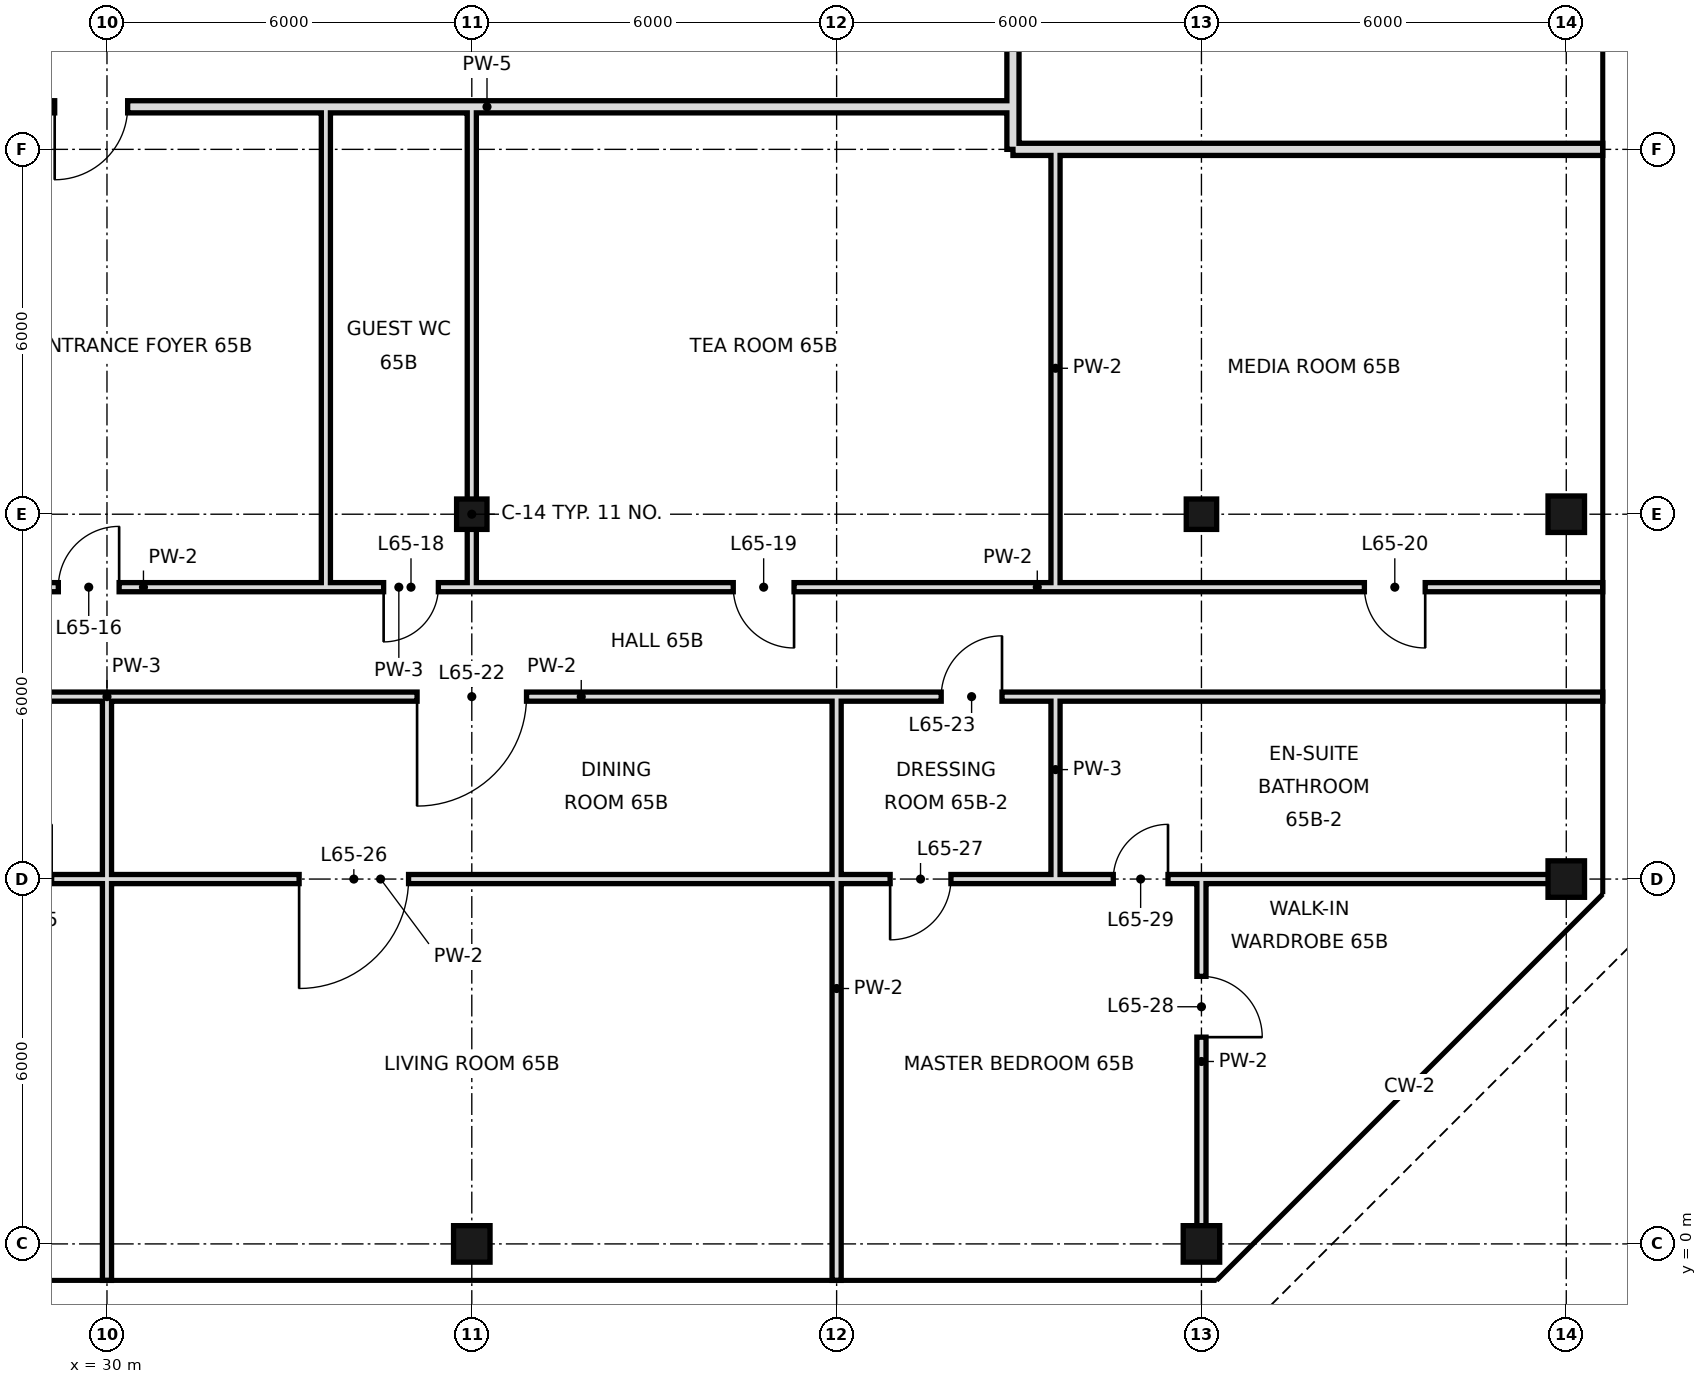
"""IFC4 building model, lengths in metres.
Left out: names, types, materials, properties, quantities, classifications, styles, units other than length and angle.
Written with IfcOpenShell. Run it as: python <this file> out.ifc"""

import sys

from ifc_helpers import new_model, si_unit, direction, frame, frame_2d, origin, origin_2d, place, context, subcontext, project, spatial, rectangle, hollow_rectangle, extrude, element, fill, save


model = new_model("IFC4")
c1 = context("Model", 3, precision=1e-05, world=origin(), true_north=direction((0.0, 1.0)))
c2 = subcontext(c1, "Body", "Model", "MODEL_VIEW")
j1 = project(units=[si_unit("LENGTHUNIT", "METRE"), si_unit("PLANEANGLEUNIT", "RADIAN")], contexts=[c1])
p1 = place(None, origin())
s1 = spatial("IfcSite", under=j1, at=p1, CompositionType="ELEMENT")
p2 = place(p1, origin())
s2 = spatial("IfcBuilding", under=s1, at=p2, CompositionType="ELEMENT")
p3 = place(p2, frame((0.0, 0.0, 273.8)))
s3 = spatial("IfcBuildingStorey", under=s2, at=p3, CompositionType="ELEMENT", Elevation=273.8)
p4 = place(p3, frame((36.0, 0.0, 0.0), z_axis=(0.0, 0.0, 1.0), x_axis=(1.0, 0.0, 0.0)))
e1 = element("IfcColumn", 1, at=p4, inside=s3, PredefinedType="COLUMN", context=c2, shape_type="SweptSolid", body=[
    extrude(hollow_rectangle(XDim=0.6, YDim=0.6, WallThickness=0.028, at=origin_2d()), origin(), (0.0, 0.0, 1.0), 3.6),
])
p5 = place(p3, frame((36.0, 12.0, 0.0), z_axis=(0.0, 0.0, 1.0), x_axis=(1.0, 0.0, 0.0)))
e2 = element("IfcColumn", 2, at=p5, inside=s3, PredefinedType="COLUMN", context=c2, shape_type="SweptSolid", body=[
    extrude(hollow_rectangle(XDim=0.5, YDim=0.5, WallThickness=0.025, at=origin_2d()), origin(), (0.0, 0.0, 1.0), 3.6),
])
p6 = place(p3, frame((48.0, 0.0, 0.0), z_axis=(0.0, 0.0, 1.0), x_axis=(1.0, 0.0, 0.0)))
e3 = element("IfcColumn", 3, at=p6, inside=s3, PredefinedType="COLUMN", context=c2, shape_type="SweptSolid", body=[
    extrude(hollow_rectangle(XDim=0.6, YDim=0.6, WallThickness=0.028, at=origin_2d()), origin(), (0.0, 0.0, 1.0), 3.6),
])
p7 = place(p3, frame((48.0, 12.0, 0.0), z_axis=(0.0, 0.0, 1.0), x_axis=(1.0, 0.0, 0.0)))
e4 = element("IfcColumn", 4, at=p7, inside=s3, PredefinedType="COLUMN", context=c2, shape_type="SweptSolid", body=[
    extrude(hollow_rectangle(XDim=0.5, YDim=0.5, WallThickness=0.025, at=origin_2d()), origin(), (0.0, 0.0, 1.0), 3.6),
])
for number, where, z_axis, x_axis in (
    (5, (54.0, 6.0, 0.0), (0.0, 0.0, 1.0), (1.0, 0.0, 0.0)),
    (6, (54.0, 12.0, 0.0), (0.0, 0.0, 1.0), (1.0, 0.0, 0.0)),
):
    element("IfcColumn", number, at=place(p3, frame(where, z_axis=z_axis, x_axis=x_axis)), inside=s3, PredefinedType="COLUMN", context=c2, shape_type="SweptSolid", body=[
        extrude(hollow_rectangle(XDim=0.6, YDim=0.6, WallThickness=0.028, at=origin_2d()), origin(), (0.0, 0.0, 1.0), 3.6),
    ])
p8 = place(p3, frame((30.0, -0.6, 0.0), z_axis=(0.0, 0.0, 1.0), x_axis=(0.0, 1.0, 0.0)))
e7 = element("IfcWall", 7, at=p8, inside=s3, PredefinedType="PARTITIONING", context=c2, shape_type="SweptSolid", body=[
    extrude(rectangle(XDim=6.6, YDim=0.15, at=frame_2d((3.3, 0.0))), origin(), (0.0, 0.0, 1.0), 2.72),
])
p9 = place(p3, frame((30.0, 6.0, 0.0), z_axis=(0.0, 0.0, 1.0), x_axis=(0.0, 1.0, 0.0)))
e8 = element("IfcWall", 8, at=p9, inside=s3, PredefinedType="PARTITIONING", context=c2, shape_type="SweptSolid", body=[
    extrude(rectangle(XDim=3.0, YDim=0.15, at=frame_2d((1.5, 0.0))), origin(), (0.0, 0.0, 1.0), 2.72),
])
p10 = place(p3, frame((33.6, 10.8, 0.0), z_axis=(0.0, 0.0, 1.0), x_axis=(0.0, 1.0, 0.0)))
e9 = element("IfcWall", 9, at=p10, inside=s3, PredefinedType="PARTITIONING", context=c2, shape_type="SweptSolid", body=[
    extrude(rectangle(XDim=7.9, YDim=0.15, at=frame_2d((3.95, 0.0))), origin(), (0.0, 0.0, 1.0), 3.42),
])
p11 = place(p3, frame((36.0, 10.8, 0.0), z_axis=(0.0, 0.0, 1.0), x_axis=(0.0, 1.0, 0.0)))
e10 = element("IfcWall", 10, at=p11, inside=s3, PredefinedType="PARTITIONING", context=c2, shape_type="SweptSolid", body=[
    extrude(rectangle(XDim=7.9, YDim=0.15, at=frame_2d((3.95, 0.0))), origin(), (0.0, 0.0, 1.0), 2.72),
])
p12 = place(p3, frame((42.0, -0.6, 0.0), z_axis=(0.0, 0.0, 1.0), x_axis=(0.0, 1.0, 0.0)))
e11 = element("IfcWall", 11, at=p12, inside=s3, PredefinedType="PARTITIONING", context=c2, shape_type="SweptSolid", body=[
    extrude(rectangle(XDim=9.6, YDim=0.15, at=frame_2d((4.8, 0.0))), origin(), (0.0, 0.0, 1.0), 2.72),
])
p13 = place(p3, frame((44.9, 18.0, 0.0), z_axis=(0.0, 0.0, 1.0), x_axis=(0.0, 1.0, 0.0)))
e12 = element("IfcWall", 12, at=p13, inside=s3, PredefinedType="SOLIDWALL", context=c2, shape_type="SweptSolid", body=[
    extrude(rectangle(XDim=30.6, YDim=0.2, at=frame_2d((15.3, 0.0))), origin(), (0.0, 0.0, 1.0), 2.72),
])
p14 = place(p13, frame((20.27, 0.0, 0.0)))
e13 = element("IfcOpeningElement", 13, at=p14, cuts=e12, PredefinedType="OPENING", context=c2, shape_type="SweptSolid", body=[
    extrude(rectangle(XDim=1.2, YDim=2.4, at=frame_2d((0.6, 1.2))), frame((0.0, 0.11, 0.0), z_axis=(0.0, -1.0, 0.0), x_axis=(1.0, 0.0, 0.0)), (0.0, 0.0, 1.0), 0.22),
])
p15 = place(p3, frame((45.6, 10.8, 0.0), z_axis=(0.0, 0.0, 1.0), x_axis=(0.0, 1.0, 0.0)))
e14 = element("IfcWall", 14, at=p15, inside=s3, PredefinedType="PARTITIONING", context=c2, shape_type="SweptSolid", body=[
    extrude(rectangle(XDim=7.2, YDim=0.15, at=frame_2d((3.6, 0.0))), origin(), (0.0, 0.0, 1.0), 3.42),
])
p16 = place(p3, frame((45.6, 6.0, 0.0), z_axis=(0.0, 0.0, 1.0), x_axis=(0.0, 1.0, 0.0)))
e15 = element("IfcWall", 15, at=p16, inside=s3, PredefinedType="PARTITIONING", context=c2, shape_type="SweptSolid", body=[
    extrude(rectangle(XDim=3.0, YDim=0.15, at=frame_2d((1.5, 0.0))), origin(), (0.0, 0.0, 1.0), 3.42),
])
p17 = place(p3, frame((48.0, 0.0, 0.0), z_axis=(0.0, 0.0, 1.0), x_axis=(0.0, 1.0, 0.0)))
e16 = element("IfcWall", 16, at=p17, inside=s3, PredefinedType="PARTITIONING", context=c2, shape_type="SweptSolid", body=[
    extrude(rectangle(XDim=6.0, YDim=0.15, at=frame_2d((3.0, 0.0))), origin(), (0.0, 0.0, 1.0), 2.72),
])
p18 = place(p17, frame((3.4, 0.0, 0.0)))
e17 = element("IfcOpeningElement", 17, at=p18, cuts=e16, PredefinedType="OPENING", context=c2, shape_type="SweptSolid", body=[
    extrude(rectangle(XDim=1.0, YDim=2.4, at=frame_2d((0.5, 1.2))), frame((0.0, 0.085, 0.0), z_axis=(0.0, -1.0, 0.0), x_axis=(1.0, 0.0, 0.0)), (0.0, 0.0, 1.0), 0.17),
])
p19 = place(p3, frame((27.6, 10.8, 0.0), z_axis=(0.0, 0.0, 1.0), x_axis=(1.0, 0.0, 0.0)))
e18 = element("IfcWall", 18, at=p19, inside=s3, PredefinedType="PARTITIONING", context=c2, shape_type="SweptSolid", body=[
    extrude(rectangle(XDim=6.0, YDim=0.15, at=frame_2d((3.0, 0.0))), origin(), (0.0, 0.0, 1.0), 3.42),
])
p20 = place(p19, frame((1.6, 0.0, 0.0)))
e19 = element("IfcOpeningElement", 19, at=p20, cuts=e18, PredefinedType="OPENING", context=c2, shape_type="SweptSolid", body=[
    extrude(rectangle(XDim=1.0, YDim=2.4, at=frame_2d((0.5, 1.2))), frame((0.0, 0.085, 0.0), z_axis=(0.0, -1.0, 0.0), x_axis=(1.0, 0.0, 0.0)), (0.0, 0.0, 1.0), 0.17),
])
p21 = place(p3, frame((36.0, 10.8, 0.0), z_axis=(0.0, 0.0, 1.0), x_axis=(1.0, 0.0, 0.0)))
e20 = element("IfcWall", 20, at=p21, inside=s3, PredefinedType="PARTITIONING", context=c2, shape_type="SweptSolid", body=[
    extrude(rectangle(XDim=18.6, YDim=0.15, at=frame_2d((9.3, 0.0))), origin(), (0.0, 0.0, 1.0), 3.42),
])
p22 = place(p21, frame((4.3, 0.0, 0.0)))
e21 = element("IfcOpeningElement", 21, at=p22, cuts=e20, PredefinedType="OPENING", context=c2, shape_type="SweptSolid", body=[
    extrude(rectangle(XDim=1.0, YDim=2.4, at=frame_2d((0.5, 1.2))), frame((0.0, 0.085, 0.0), z_axis=(0.0, -1.0, 0.0), x_axis=(1.0, 0.0, 0.0)), (0.0, 0.0, 1.0), 0.17),
])
p23 = place(p21, frame((14.68, 0.0, 0.0)))
e22 = element("IfcOpeningElement", 22, at=p23, cuts=e20, PredefinedType="OPENING", context=c2, shape_type="SweptSolid", body=[
    extrude(rectangle(XDim=1.0, YDim=2.4, at=frame_2d((0.5, 1.2))), frame((0.0, 0.085, 0.0), z_axis=(0.0, -1.0, 0.0), x_axis=(1.0, 0.0, 0.0)), (0.0, 0.0, 1.0), 0.17),
])
p24 = place(p3, frame((33.6, 10.8, 0.0), z_axis=(0.0, 0.0, 1.0), x_axis=(1.0, 0.0, 0.0)))
e23 = element("IfcWall", 23, at=p24, inside=s3, PredefinedType="PARTITIONING", context=c2, shape_type="SweptSolid", body=[
    extrude(rectangle(XDim=2.4, YDim=0.15, at=frame_2d((1.2, 0.0))), origin(), (0.0, 0.0, 1.0), 3.42),
])
p25 = place(p24, frame((0.95, 0.0, 0.0)))
e24 = element("IfcOpeningElement", 24, at=p25, cuts=e23, PredefinedType="OPENING", context=c2, shape_type="SweptSolid", body=[
    extrude(rectangle(XDim=0.9, YDim=2.4, at=frame_2d((0.45, 1.2))), frame((0.0, 0.085, 0.0), z_axis=(0.0, -1.0, 0.0), x_axis=(1.0, 0.0, 0.0)), (0.0, 0.0, 1.0), 0.17),
])
p26 = place(p3, frame((44.9, 18.0, 0.0), z_axis=(0.0, 0.0, 1.0), x_axis=(1.0, 0.0, 0.0)))
e25 = element("IfcWall", 25, at=p26, inside=s3, PredefinedType="SOLIDWALL", context=c2, shape_type="SweptSolid", body=[
    extrude(rectangle(XDim=9.7, YDim=0.2, at=frame_2d((4.85, 0.0))), origin(), (0.0, 0.0, 1.0), 2.72),
])
p27 = place(p3, frame((27.6, 18.7, 0.0), z_axis=(0.0, 0.0, 1.0), x_axis=(1.0, 0.0, 0.0)))
e26 = element("IfcWall", 26, at=p27, inside=s3, PredefinedType="SOLIDWALL", context=c2, shape_type="SweptSolid", body=[
    extrude(rectangle(XDim=17.3, YDim=0.2, at=frame_2d((8.65, 0.0))), origin(), (0.0, 0.0, 1.0), 2.72),
])
p28 = place(p27, frame((1.54, 0.0, 0.0)))
e27 = element("IfcOpeningElement", 27, at=p28, cuts=e26, PredefinedType="OPENING", context=c2, shape_type="SweptSolid", body=[
    extrude(rectangle(XDim=1.2, YDim=2.4, at=frame_2d((0.6, 1.2))), frame((0.0, 0.11, 0.0), z_axis=(0.0, -1.0, 0.0), x_axis=(1.0, 0.0, 0.0)), (0.0, 0.0, 1.0), 0.22),
])
p29 = place(p3, frame((30.0, 6.0, 0.0), z_axis=(0.0, 0.0, 1.0), x_axis=(1.0, 0.0, 0.0)))
e28 = element("IfcWall", 28, at=p29, inside=s3, PredefinedType="PARTITIONING", context=c2, shape_type="SweptSolid", body=[
    extrude(rectangle(XDim=15.6, YDim=0.15, at=frame_2d((7.8, 0.0))), origin(), (0.0, 0.0, 1.0), 2.97),
])
p30 = place(p29, frame((3.16, 0.0, 0.0)))
e29 = element("IfcOpeningElement", 29, at=p30, cuts=e28, PredefinedType="OPENING", context=c2, shape_type="SweptSolid", body=[
    extrude(rectangle(XDim=1.8, YDim=2.4, at=frame_2d((0.9, 1.2))), frame((0.0, 0.085, 0.0), z_axis=(0.0, -1.0, 0.0), x_axis=(1.0, 0.0, 0.0)), (0.0, 0.0, 1.0), 0.17),
])
p31 = place(p29, frame((12.88, 0.0, 0.0)))
e30 = element("IfcOpeningElement", 30, at=p31, cuts=e28, PredefinedType="OPENING", context=c2, shape_type="SweptSolid", body=[
    extrude(rectangle(XDim=1.0, YDim=2.4, at=frame_2d((0.5, 1.2))), frame((0.0, 0.085, 0.0), z_axis=(0.0, -1.0, 0.0), x_axis=(1.0, 0.0, 0.0)), (0.0, 0.0, 1.0), 0.17),
])
p32 = place(p3, frame((26.4, 6.0, 0.0), z_axis=(0.0, 0.0, 1.0), x_axis=(1.0, 0.0, 0.0)))
e31 = element("IfcWall", 31, at=p32, inside=s3, PredefinedType="PARTITIONING", context=c2, shape_type="SweptSolid", body=[
    extrude(rectangle(XDim=3.6, YDim=0.15, at=frame_2d((1.8, 0.0))), origin(), (0.0, 0.0, 1.0), 2.97),
])
p33 = place(p32, frame((1.79, 0.0, 0.0)))
e32 = element("IfcOpeningElement", 32, at=p33, cuts=e31, PredefinedType="OPENING", context=c2, shape_type="SweptSolid", body=[
    extrude(rectangle(XDim=0.9, YDim=2.4, at=frame_2d((0.45, 1.2))), frame((0.0, 0.085, 0.0), z_axis=(0.0, -1.0, 0.0), x_axis=(1.0, 0.0, 0.0)), (0.0, 0.0, 1.0), 0.17),
])
p34 = place(p3, frame((45.6, 6.0, 0.0), z_axis=(0.0, 0.0, 1.0), x_axis=(1.0, 0.0, 0.0)))
e33 = element("IfcWall", 33, at=p34, inside=s3, PredefinedType="PARTITIONING", context=c2, shape_type="SweptSolid", body=[
    extrude(rectangle(XDim=8.4, YDim=0.15, at=frame_2d((4.2, 0.0))), origin(), (0.0, 0.0, 1.0), 2.97),
])
p35 = place(p34, frame((0.95, 0.0, 0.0)))
e34 = element("IfcOpeningElement", 34, at=p35, cuts=e33, PredefinedType="OPENING", context=c2, shape_type="SweptSolid", body=[
    extrude(rectangle(XDim=0.9, YDim=2.4, at=frame_2d((0.45, 1.2))), frame((0.0, 0.085, 0.0), z_axis=(0.0, -1.0, 0.0), x_axis=(1.0, 0.0, 0.0)), (0.0, 0.0, 1.0), 0.17),
])
p36 = place(p3, frame((30.0, 9.0, 0.0), z_axis=(0.0, 0.0, 1.0), x_axis=(1.0, 0.0, 0.0)))
e35 = element("IfcWall", 35, at=p36, inside=s3, PredefinedType="PARTITIONING", context=c2, shape_type="SweptSolid", body=[
    extrude(rectangle(XDim=15.6, YDim=0.15, at=frame_2d((7.8, 0.0))), origin(), (0.0, 0.0, 1.0), 3.42),
])
p37 = place(p36, frame((5.1, 0.0, 0.0)))
e36 = element("IfcOpeningElement", 36, at=p37, cuts=e35, PredefinedType="OPENING", context=c2, shape_type="SweptSolid", body=[
    extrude(rectangle(XDim=1.8, YDim=2.4, at=frame_2d((0.9, 1.2))), frame((0.0, 0.085, 0.0), z_axis=(0.0, -1.0, 0.0), x_axis=(1.0, 0.0, 0.0)), (0.0, 0.0, 1.0), 0.17),
])
p38 = place(p36, frame((13.72, 0.0, 0.0)))
e37 = element("IfcOpeningElement", 37, at=p38, cuts=e35, PredefinedType="OPENING", context=c2, shape_type="SweptSolid", body=[
    extrude(rectangle(XDim=1.0, YDim=2.4, at=frame_2d((0.5, 1.2))), frame((0.0, 0.085, 0.0), z_axis=(0.0, -1.0, 0.0), x_axis=(1.0, 0.0, 0.0)), (0.0, 0.0, 1.0), 0.17),
])
p39 = place(p3, frame((26.4, 9.0, 0.0), z_axis=(0.0, 0.0, 1.0), x_axis=(1.0, 0.0, 0.0)))
e38 = element("IfcWall", 38, at=p39, inside=s3, PredefinedType="PARTITIONING", context=c2, shape_type="SweptSolid", body=[
    extrude(rectangle(XDim=3.6, YDim=0.15, at=frame_2d((1.8, 0.0))), origin(), (0.0, 0.0, 1.0), 3.42),
])
p40 = place(p3, frame((45.6, 9.0, 0.0), z_axis=(0.0, 0.0, 1.0), x_axis=(1.0, 0.0, 0.0)))
e39 = element("IfcWall", 39, at=p40, inside=s3, PredefinedType="PARTITIONING", context=c2, shape_type="SweptSolid", body=[
    extrude(rectangle(XDim=9.0, YDim=0.15, at=frame_2d((4.5, 0.0))), origin(), (0.0, 0.0, 1.0), 3.42),
])
p41 = place(p20, frame((1.0, 0.0, 0.0), z_axis=(0.0, 0.0, 1.0), x_axis=(-1.0, 0.0, 0.0)))
e40 = element("IfcDoor", 40, at=p41, inside=s3, OperationType="SINGLE_SWING_LEFT", PredefinedType="DOOR", context=c2, shape_type="SweptSolid", body=[
    extrude(rectangle(XDim=1.0, YDim=2.4, at=frame_2d((0.5, 1.2))), frame((0.0, 0.025, 0.0), z_axis=(0.0, -1.0, 0.0), x_axis=(1.0, 0.0, 0.0)), (0.0, 0.0, 1.0), 0.05),
])
fill(e19, e40)
p42 = place(p25, frame((0.9, 0.0, 0.0), z_axis=(0.0, 0.0, 1.0), x_axis=(-1.0, 0.0, 0.0)))
e41 = element("IfcDoor", 41, at=p42, inside=s3, OperationType="SINGLE_SWING_RIGHT", PredefinedType="DOOR", context=c2, shape_type="SweptSolid", body=[
    extrude(rectangle(XDim=0.9, YDim=2.4, at=frame_2d((0.45, 1.2))), frame((0.0, 0.025, 0.0), z_axis=(0.0, -1.0, 0.0), x_axis=(1.0, 0.0, 0.0)), (0.0, 0.0, 1.0), 0.05),
])
fill(e24, e41)
p43 = place(p22, origin())
e42 = element("IfcDoor", 42, at=p43, inside=s3, OperationType="SINGLE_SWING_RIGHT", PredefinedType="DOOR", context=c2, shape_type="SweptSolid", body=[
    extrude(rectangle(XDim=1.0, YDim=2.4, at=frame_2d((0.5, 1.2))), frame((0.0, 0.025, 0.0), z_axis=(0.0, -1.0, 0.0), x_axis=(1.0, 0.0, 0.0)), (0.0, 0.0, 1.0), 0.05),
])
fill(e21, e42)
p44 = place(p23, origin())
e43 = element("IfcDoor", 43, at=p44, inside=s3, OperationType="SINGLE_SWING_RIGHT", PredefinedType="DOOR", context=c2, shape_type="SweptSolid", body=[
    extrude(rectangle(XDim=1.0, YDim=2.4, at=frame_2d((0.5, 1.2))), frame((0.0, 0.025, 0.0), z_axis=(0.0, -1.0, 0.0), x_axis=(1.0, 0.0, 0.0)), (0.0, 0.0, 1.0), 0.05),
])
fill(e22, e43)
p45 = place(p37, frame((1.8, 0.0, 0.0), z_axis=(0.0, 0.0, 1.0), x_axis=(-1.0, 0.0, 0.0)))
e44 = element("IfcDoor", 44, at=p45, inside=s3, OperationType="SINGLE_SWING_RIGHT", PredefinedType="DOOR", context=c2, shape_type="SweptSolid", body=[
    extrude(rectangle(XDim=1.8, YDim=2.4, at=frame_2d((0.9, 1.2))), frame((0.0, 0.025, 0.0), z_axis=(0.0, -1.0, 0.0), x_axis=(1.0, 0.0, 0.0)), (0.0, 0.0, 1.0), 0.05),
])
fill(e36, e44)
p46 = place(p38, frame((1.0, 0.0, 0.0), z_axis=(0.0, 0.0, 1.0), x_axis=(-1.0, 0.0, 0.0)))
e45 = element("IfcDoor", 45, at=p46, inside=s3, OperationType="SINGLE_SWING_LEFT", PredefinedType="DOOR", context=c2, shape_type="SweptSolid", body=[
    extrude(rectangle(XDim=1.0, YDim=2.4, at=frame_2d((0.5, 1.2))), frame((0.0, 0.025, 0.0), z_axis=(0.0, -1.0, 0.0), x_axis=(1.0, 0.0, 0.0)), (0.0, 0.0, 1.0), 0.05),
])
fill(e37, e45)
p47 = place(p30, frame((1.8, 0.0, 0.0), z_axis=(0.0, 0.0, 1.0), x_axis=(-1.0, 0.0, 0.0)))
e46 = element("IfcDoor", 46, at=p47, inside=s3, OperationType="SINGLE_SWING_RIGHT", PredefinedType="DOOR", context=c2, shape_type="SweptSolid", body=[
    extrude(rectangle(XDim=1.8, YDim=2.4, at=frame_2d((0.9, 1.2))), frame((0.0, 0.025, 0.0), z_axis=(0.0, -1.0, 0.0), x_axis=(1.0, 0.0, 0.0)), (0.0, 0.0, 1.0), 0.05),
])
fill(e29, e46)
p48 = place(p31, frame((1.0, 0.0, 0.0), z_axis=(0.0, 0.0, 1.0), x_axis=(-1.0, 0.0, 0.0)))
e47 = element("IfcDoor", 47, at=p48, inside=s3, OperationType="SINGLE_SWING_RIGHT", PredefinedType="DOOR", context=c2, shape_type="SweptSolid", body=[
    extrude(rectangle(XDim=1.0, YDim=2.4, at=frame_2d((0.5, 1.2))), frame((0.0, 0.025, 0.0), z_axis=(0.0, -1.0, 0.0), x_axis=(1.0, 0.0, 0.0)), (0.0, 0.0, 1.0), 0.05),
])
fill(e30, e47)
p49 = place(p18, frame((1.0, 0.0, 0.0), z_axis=(0.0, 0.0, 1.0), x_axis=(-1.0, 0.0, 0.0)))
e48 = element("IfcDoor", 48, at=p49, inside=s3, OperationType="SINGLE_SWING_RIGHT", PredefinedType="DOOR", context=c2, shape_type="SweptSolid", body=[
    extrude(rectangle(XDim=1.0, YDim=2.4, at=frame_2d((0.5, 1.2))), frame((0.0, 0.025, 0.0), z_axis=(0.0, -1.0, 0.0), x_axis=(1.0, 0.0, 0.0)), (0.0, 0.0, 1.0), 0.05),
])
fill(e17, e48)
p50 = place(p35, frame((0.9, 0.0, 0.0), z_axis=(0.0, 0.0, 1.0), x_axis=(-1.0, 0.0, 0.0)))
e49 = element("IfcDoor", 49, at=p50, inside=s3, OperationType="SINGLE_SWING_LEFT", PredefinedType="DOOR", context=c2, shape_type="SweptSolid", body=[
    extrude(rectangle(XDim=0.9, YDim=2.4, at=frame_2d((0.45, 1.2))), frame((0.0, 0.025, 0.0), z_axis=(0.0, -1.0, 0.0), x_axis=(1.0, 0.0, 0.0)), (0.0, 0.0, 1.0), 0.05),
])
fill(e34, e49)
p51 = place(p28, frame((1.2, 0.0, 0.0), z_axis=(0.0, 0.0, 1.0), x_axis=(-1.0, 0.0, 0.0)))
e50 = element("IfcDoor", 50, at=p51, inside=s3, OperationType="SINGLE_SWING_RIGHT", PredefinedType="DOOR", context=c2, shape_type="SweptSolid", body=[
    extrude(rectangle(XDim=1.2, YDim=2.4, at=frame_2d((0.6, 1.2))), frame((0.0, 0.025, 0.0), z_axis=(0.0, -1.0, 0.0), x_axis=(1.0, 0.0, 0.0)), (0.0, 0.0, 1.0), 0.05),
])
fill(e27, e50)
save(model, sys.argv[1])
